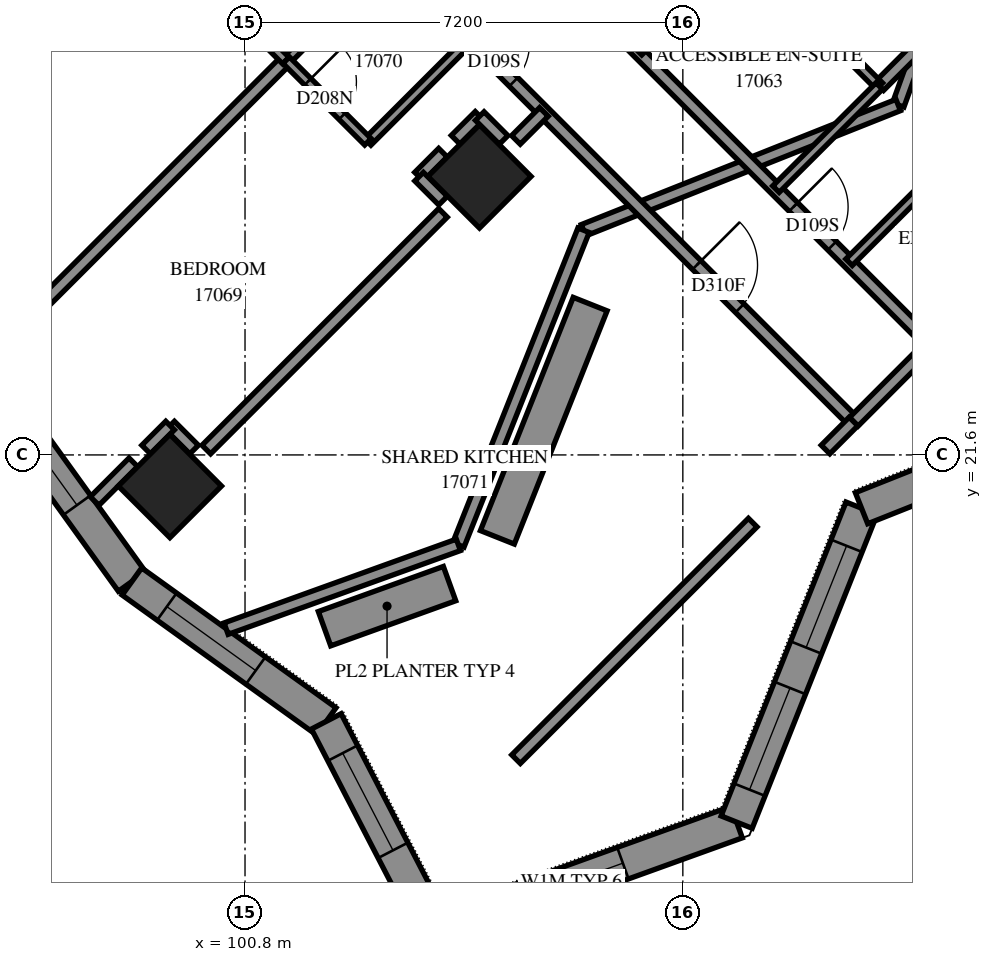
"""IFC4 building model, lengths in metres.
Left out: names, types, materials, properties, quantities, classifications, styles, units other than length and angle.
Written with IfcOpenShell. Run it as: python <this file> out.ifc"""

import sys

from ifc_helpers import new_model, si_unit, direction, frame, frame_2d, origin, origin_2d, place, context, subcontext, project, spatial, polyline, rectangle, outline, extrude, element, fill, save


model = new_model("IFC4")
c1 = context("Model", 3, precision=1e-05, world=origin(), true_north=direction((0.0, 1.0)))
c2 = subcontext(c1, "Body", "Model", "MODEL_VIEW")
j1 = project(units=[si_unit("LENGTHUNIT", "METRE"), si_unit("PLANEANGLEUNIT", "RADIAN")], contexts=[c1])
p1 = place(None, origin())
s1 = spatial("IfcSite", under=j1, at=p1, CompositionType="ELEMENT")
p2 = place(p1, origin())
s2 = spatial("IfcBuilding", under=s1, at=p2, CompositionType="ELEMENT")
p3 = place(p2, frame((0.0, 0.0, 64.4)))
s3 = spatial("IfcBuildingStorey", under=s2, at=p3, CompositionType="ELEMENT", Elevation=64.4)
for number, where, z_axis, x_axis in (
    (1, (104.656, 26.18, 0.0), (0.0, 0.0, 1.0), (0.707, -0.707, 0.0)),
    (2, (99.565, 21.088, 0.0), (0.0, 0.0, 1.0), (0.707, -0.707, 0.0)),
):
    element("IfcColumn", number, at=place(p3, frame(where, z_axis=z_axis, x_axis=x_axis)), inside=s3, PredefinedType="COLUMN", context=c2, shape_type="SweptSolid", body=[
        extrude(rectangle(XDim=1.2, YDim=1.2, at=origin_2d()), origin(), (0.0, 0.0, 1.0), 3.1),
    ])
p4 = place(p3, frame((103.919, 13.771, 0.0), z_axis=(0.0, 0.0, 1.0), x_axis=(0.9406967124, 0.3392487217, 0.0)))
e3 = element("IfcWall", 3, at=p4, inside=s3, PredefinedType="SOLIDWALL", context=c2, shape_type="SweptSolid", body=[
    extrude(outline(polyline([(-0.241, -0.275), (5.402, -0.275), (5.155, 0.275), (0.241, 0.275), (-0.241, -0.275)])), origin(), (0.0, 0.0, 1.0), 3.1),
])
p5 = place(p4, frame((1.489, 0.0, 0.7)))
e4 = element("IfcOpeningElement", 4, at=p5, cuts=e3, PredefinedType="OPENING", context=c2, shape_type="SweptSolid", body=[
    extrude(rectangle(XDim=1.8, YDim=1.8, at=frame_2d((0.9, 0.9))), frame((0.0, 0.285, 0.0), z_axis=(0.0, -1.0, 0.0), x_axis=(1.0, 0.0, 0.0)), (0.0, 0.0, 1.0), 0.57),
])
p6 = place(p3, frame((108.885, 15.562, 0.0), z_axis=(0.0, 0.0, 1.0), x_axis=(0.3697018694, 0.9291504333, 0.0)))
e5 = element("IfcWall", 5, at=p6, inside=s3, PredefinedType="SOLIDWALL", context=c2, shape_type="SweptSolid", body=[
    extrude(outline(polyline([(-0.124, -0.275), (5.437, -0.275), (5.674, 0.275), (0.124, 0.275), (-0.124, -0.275)])), origin(), (0.0, 0.0, 1.0), 3.1),
])
p7 = place(p6, frame((0.574, 0.0, 0.7)))
e6 = element("IfcOpeningElement", 6, at=p7, cuts=e5, PredefinedType="OPENING", context=c2, shape_type="SweptSolid", body=[
    extrude(rectangle(XDim=1.8, YDim=1.8, at=frame_2d((0.9, 0.9))), frame((0.0, 0.285, 0.0), z_axis=(0.0, -1.0, 0.0), x_axis=(1.0, 0.0, 0.0)), (0.0, 0.0, 1.0), 0.57),
])
p8 = place(p6, frame((3.09, 0.0, 0.7)))
e7 = element("IfcOpeningElement", 7, at=p8, cuts=e5, PredefinedType="OPENING", context=c2, shape_type="SweptSolid", body=[
    extrude(rectangle(XDim=1.8, YDim=1.8, at=frame_2d((0.9, 0.9))), frame((0.0, 0.285, 0.0), z_axis=(0.0, -1.0, 0.0), x_axis=(1.0, 0.0, 0.0)), (0.0, 0.0, 1.0), 0.57),
])
p9 = place(p3, frame((110.939, 20.724, 0.0), z_axis=(0.0, 0.0, 1.0), x_axis=(0.9291504333, 0.3697018694, 0.0)))
e8 = element("IfcWall", 8, at=p9, inside=s3, PredefinedType="SOLIDWALL", context=c2, shape_type="SweptSolid", body=[
    extrude(outline(polyline([(0.118, -0.275), (5.68, -0.275), (5.432, 0.275), (-0.118, 0.275), (0.118, -0.275)])), origin(), (0.0, 0.0, 1.0), 3.1),
])
p10 = place(p9, frame((1.749, 0.0, 0.7)))
e9 = element("IfcOpeningElement", 9, at=p10, cuts=e8, PredefinedType="OPENING", context=c2, shape_type="SweptSolid", body=[
    extrude(rectangle(XDim=1.8, YDim=2.0, at=frame_2d((0.9, 1.0))), frame((0.0, 0.285, 0.0), z_axis=(0.0, -1.0, 0.0), x_axis=(1.0, 0.0, 0.0)), (0.0, 0.0, 1.0), 0.57),
])
p11 = place(p3, frame((96.652, 22.698, 0.0), z_axis=(0.0, 0.0, 1.0), x_axis=(0.5841782792, -0.8116253681, 0.0)))
e10 = element("IfcWall", 10, at=p11, inside=s3, PredefinedType="SOLIDWALL", context=c2, shape_type="SweptSolid", body=[
    extrude(outline(polyline([(0.045, -0.275), (3.962, -0.275), (3.872, 0.275), (-0.045, 0.275), (0.045, -0.275)])), origin(), (0.0, 0.0, 1.0), 3.1),
])
p12 = place(p11, frame((0.57, 0.0, 0.7)))
e11 = element("IfcOpeningElement", 11, at=p12, cuts=e10, PredefinedType="OPENING", context=c2, shape_type="SweptSolid", body=[
    extrude(rectangle(XDim=1.8, YDim=2.0, at=frame_2d((0.9, 1.0))), frame((0.0, 0.285, 0.0), z_axis=(0.0, -1.0, 0.0), x_axis=(1.0, 0.0, 0.0)), (0.0, 0.0, 1.0), 0.57),
])
p13 = place(p3, frame((98.94, 19.519, 0.0), z_axis=(0.0, 0.0, 1.0), x_axis=(0.8116263259, -0.5841769485, 0.0)))
e12 = element("IfcWall", 12, at=p13, inside=s3, PredefinedType="SOLIDWALL", context=c2, shape_type="SweptSolid", body=[
    extrude(outline(polyline([(-0.045, -0.275), (3.872, -0.275), (4.004, 0.275), (0.045, 0.275), (-0.045, -0.275)])), origin(), (0.0, 0.0, 1.0), 3.1),
])
p14 = place(p13, frame((0.708, 0.0, 0.7)))
e13 = element("IfcOpeningElement", 13, at=p14, cuts=e12, PredefinedType="OPENING", context=c2, shape_type="SweptSolid", body=[
    extrude(rectangle(XDim=1.8, YDim=2.0, at=frame_2d((0.9, 1.0))), frame((0.0, 0.285, 0.0), z_axis=(0.0, -1.0, 0.0), x_axis=(1.0, 0.0, 0.0)), (0.0, 0.0, 1.0), 0.57),
])
p15 = place(p3, frame((102.136, 17.218, 0.0), z_axis=(0.0, 0.0, 1.0), x_axis=(0.4594243206, -0.8882169181, 0.0)))
e14 = element("IfcWall", 14, at=p15, inside=s3, PredefinedType="SOLIDWALL", context=c2, shape_type="SweptSolid", body=[
    extrude(outline(polyline([(0.066, -0.275), (4.123, -0.275), (3.64, 0.275), (-0.066, 0.275), (0.066, -0.275)])), origin(), (0.0, 0.0, 1.0), 3.1),
])
p16 = place(p15, frame((0.588, 0.0, 0.7)))
e15 = element("IfcOpeningElement", 15, at=p16, cuts=e14, PredefinedType="OPENING", context=c2, shape_type="SweptSolid", body=[
    extrude(rectangle(XDim=1.8, YDim=1.8, at=frame_2d((0.9, 0.9))), frame((0.0, 0.285, 0.0), z_axis=(0.0, -1.0, 0.0), x_axis=(1.0, 0.0, 0.0)), (0.0, 0.0, 1.0), 0.57),
])
p17 = place(p3, frame((113.239, 32.061, 0.0), z_axis=(0.0, 0.0, 1.0), x_axis=(-0.3392575143, -0.9406935415, 0.0)))
e16 = element("IfcWall", 16, at=p17, inside=s3, PredefinedType="PARAPET", context=c2, shape_type="SweptSolid", body=[
    extrude(outline(polyline([(0.0, -0.1), (4.185, -0.1), (4.185, 0.1), (0.0, 0.1), (0.0, -0.1)])), origin(), (0.0, 0.0, 1.0), 0.25),
])
p18 = place(p3, frame((111.819, 28.124, 0.0), z_axis=(0.0, 0.0, 1.0), x_axis=(-0.3392690321, -0.9406893876, 0.0)))
e17 = element("IfcWall", 17, at=p18, inside=s3, PredefinedType="PARAPET", context=c2, shape_type="SweptSolid", body=[
    extrude(outline(polyline([(0.0, -0.1), (0.773, -0.1), (0.863, 0.1), (0.0, 0.1), (0.0, -0.1)])), origin(), (0.0, 0.0, 1.0), 0.25),
])
p19 = place(p3, frame((111.542, 27.354, 0.0), z_axis=(0.0, 0.0, 1.0), x_axis=(-0.9291537819, -0.3696934536, 0.0)))
e18 = element("IfcWall", 18, at=p19, inside=s3, PredefinedType="PARAPET", context=c2, shape_type="SweptSolid", body=[
    extrude(outline(polyline([(0.045, -0.1), (5.612, -0.1), (5.526, 0.1), (-0.045, 0.1), (0.045, -0.1)])), origin(), (0.0, 0.0, 1.0), 0.25),
])
p20 = place(p3, frame((106.367, 25.295, 0.0), z_axis=(0.0, 0.0, 1.0), x_axis=(-0.3696779509, -0.92915995, 0.0)))
e19 = element("IfcWall", 19, at=p20, inside=s3, PredefinedType="PARAPET", context=c2, shape_type="SweptSolid", body=[
    extrude(outline(polyline([(-0.043, -0.1), (5.524, -0.1), (5.614, 0.1), (0.043, 0.1), (-0.043, -0.1)])), origin(), (0.0, 0.0, 1.0), 0.25),
])
p21 = place(p3, frame((104.309, 20.121, 0.0), z_axis=(0.0, 0.0, 1.0), x_axis=(-0.9407017457, -0.3392347648, 0.0)))
e20 = element("IfcWall", 20, at=p21, inside=s3, PredefinedType="PARAPET", context=c2, shape_type="SweptSolid", body=[
    extrude(outline(polyline([(0.045, -0.1), (4.061, -0.1), (4.061, 0.1), (-0.045, 0.1), (0.045, -0.1)])), origin(), (0.0, 0.0, 1.0), 0.25),
])
p22 = place(p3, frame((106.476, 24.081, 0.0), z_axis=(0.0, 0.0, 1.0), x_axis=(-0.369669248, -0.9291634125, 0.0)))
e21 = element("IfcWall", 21, at=p22, inside=s3, PredefinedType="SOLIDWALL", context=c2, shape_type="SweptSolid", body=[
    extrude(rectangle(XDim=4.128, YDim=0.6, at=frame_2d((2.064, 0.0))), origin(), (0.0, 0.0, 1.0), 0.65),
])
p23 = place(p3, frame((101.825, 31.125, 0.0), z_axis=(0.0, 0.0, 1.0), x_axis=(0.7071067812, -0.7071067812, 0.0)))
e22 = element("IfcWall", 22, at=p23, inside=s3, PredefinedType="PARTITIONING", context=c2, shape_type="SweptSolid", body=[
    extrude(rectangle(XDim=12.7, YDim=0.2, at=frame_2d((6.35, 0.0))), origin(), (0.0, 0.0, 1.0), 3.1),
])
p24 = place(p23, frame((3.895, 0.0, 0.0)))
e23 = element("IfcOpeningElement", 23, at=p24, cuts=e22, PredefinedType="OPENING", context=c2, shape_type="SweptSolid", body=[
    extrude(rectangle(XDim=0.9, YDim=2.1, at=frame_2d((0.45, 1.05))), frame((0.0, 0.11, 0.0), z_axis=(0.0, -1.0, 0.0), x_axis=(1.0, 0.0, 0.0)), (0.0, 0.0, 1.0), 0.22),
])
p25 = place(p23, frame((9.056, 0.0, 0.0)))
e24 = element("IfcOpeningElement", 24, at=p25, cuts=e22, PredefinedType="OPENING", context=c2, shape_type="SweptSolid", body=[
    extrude(rectangle(XDim=1.0, YDim=2.1, at=frame_2d((0.5, 1.05))), frame((0.0, 0.11, 0.0), z_axis=(0.0, -1.0, 0.0), x_axis=(1.0, 0.0, 0.0)), (0.0, 0.0, 1.0), 0.22),
])
p26 = place(p3, frame((106.987, 28.509, 0.0), z_axis=(0.0, 0.0, 1.0), x_axis=(0.7071067812, -0.7071067812, 0.0)))
e25 = element("IfcWall", 25, at=p26, inside=s3, PredefinedType="PARTITIONING", context=c2, shape_type="SweptSolid", body=[
    extrude(rectangle(XDim=7.198, YDim=0.2, at=frame_2d((3.599, 0.0))), origin(), (0.0, 0.0, 1.0), 3.1),
])
p27 = place(p26, frame((4.004, 0.0, 0.0)))
e26 = element("IfcOpeningElement", 26, at=p27, cuts=e25, PredefinedType="OPENING", context=c2, shape_type="SweptSolid", body=[
    extrude(rectangle(XDim=0.9, YDim=2.1, at=frame_2d((0.45, 1.05))), frame((0.0, 0.11, 0.0), z_axis=(0.0, -1.0, 0.0), x_axis=(1.0, 0.0, 0.0)), (0.0, 0.0, 1.0), 0.22),
])
p28 = place(p3, frame((96.517, 23.134, 0.0), z_axis=(0.0, 0.0, 1.0), x_axis=(0.7071139158, 0.7070996465, 0.0)))
e27 = element("IfcWall", 27, at=p28, inside=s3, PredefinedType="PARTITIONING", context=c2, shape_type="SweptSolid", body=[
    extrude(rectangle(XDim=7.008, YDim=0.2, at=frame_2d((3.504, 0.0))), origin(), (0.0, 0.0, 1.0), 3.1),
])
p29 = place(p3, frame((100.163, 21.689, 0.0), z_axis=(0.0, 0.0, 1.0), x_axis=(0.7071067812, 0.7071067812, 0.0)))
e28 = element("IfcWall", 28, at=p29, inside=s3, PredefinedType="PARTITIONING", context=c2, shape_type="SweptSolid", body=[
    extrude(rectangle(XDim=5.504, YDim=0.2, at=frame_2d((2.752, 0.0))), origin(), (0.0, 0.0, 1.0), 2.6),
])
p30 = place(p3, frame((105.257, 16.597, 0.0), z_axis=(0.0, 0.0, 1.0), x_axis=(0.7072884866, 0.706925029, 0.0)))
e29 = element("IfcWall", 29, at=p30, inside=s3, PredefinedType="PARTITIONING", context=c2, shape_type="SweptSolid", body=[
    extrude(rectangle(XDim=5.503, YDim=0.2, at=frame_2d((2.751, 0.0))), origin(), (0.0, 0.0, 1.0), 3.1),
])
p31 = place(p3, frame((111.231, 27.665, 0.0), z_axis=(0.0, 0.0, 1.0), x_axis=(0.7071067812, 0.7071067812, 0.0)))
e30 = element("IfcWall", 30, at=p31, inside=s3, PredefinedType="PARTITIONING", context=c2, shape_type="SweptSolid", body=[
    extrude(rectangle(XDim=4.55, YDim=0.2, at=frame_2d((2.275, 0.0))), origin(), (0.0, 0.0, 1.0), 3.1),
])
p32 = place(p3, frame((108.97, 29.928, 0.0), z_axis=(0.0, 0.0, 1.0), x_axis=(0.7067942478, -0.7074191764, 0.0)))
e31 = element("IfcWall", 31, at=p32, inside=s3, PredefinedType="PARTITIONING", context=c2, shape_type="SweptSolid", body=[
    extrude(rectangle(XDim=3.2, YDim=0.15, at=frame_2d((1.6, 0.0))), origin(), (0.0, 0.0, 1.0), 3.1),
])
p33 = place(p32, frame((1.148, 0.0, 0.0)))
e32 = element("IfcOpeningElement", 32, at=p33, cuts=e31, PredefinedType="OPENING", context=c2, shape_type="SweptSolid", body=[
    extrude(rectangle(XDim=0.8, YDim=2.1, at=frame_2d((0.4, 1.05))), frame((0.0, 0.085, 0.0), z_axis=(0.0, -1.0, 0.0), x_axis=(1.0, 0.0, 0.0)), (0.0, 0.0, 1.0), 0.17),
])
p34 = place(p3, frame((107.271, 28.231, 0.0), z_axis=(0.0, 0.0, 1.0), x_axis=(0.7071067812, 0.7071067812, 0.0)))
e33 = element("IfcWall", 33, at=p34, inside=s3, PredefinedType="PARTITIONING", context=c2, shape_type="SweptSolid", body=[
    extrude(rectangle(XDim=2.401, YDim=0.15, at=frame_2d((1.201, 0.0))), origin(), (0.0, 0.0, 1.0), 3.1),
])
for number, where, z_axis, x_axis in (
    (34, (101.477, 28.085, 0.0), (0.0, 0.0, 1.0), (0.707, 0.708, 0.0)),
    (35, (109.531, 25.971, 0.0), (0.0, 0.0, 1.0), (0.708, 0.707, 0.0)),
    (36, (110.734, 24.768, 0.0), (0.0, 0.0, 1.0), (0.708, 0.707, 0.0)),
):
    element("IfcWall", number, at=place(p3, frame(where, z_axis=z_axis, x_axis=x_axis)), inside=s3, PredefinedType="PARTITIONING", context=c2, shape_type="SweptSolid", body=[
        extrude(rectangle(XDim=2.4, YDim=0.15, at=frame_2d((1.2, 0.0))), origin(), (0.0, 0.0, 1.0), 3.1),
    ])
p35 = place(p3, frame((102.817, 26.747, 0.0), z_axis=(0.0, 0.0, 1.0), x_axis=(0.7071067812, 0.7071067812, 0.0)))
e37 = element("IfcWall", 37, at=p35, inside=s3, PredefinedType="PARTITIONING", context=c2, shape_type="SweptSolid", body=[
    extrude(rectangle(XDim=2.398, YDim=0.15, at=frame_2d((1.199, 0.0))), origin(), (0.0, 0.0, 1.0), 3.1),
])
p36 = place(p3, frame((100.127, 29.429, 0.0), z_axis=(0.0, 0.0, 1.0), x_axis=(0.7071067812, -0.7071067812, 0.0)))
e38 = element("IfcWall", 38, at=p36, inside=s3, PredefinedType="PARTITIONING", context=c2, shape_type="SweptSolid", body=[
    extrude(rectangle(XDim=1.901, YDim=0.15, at=frame_2d((0.95, 0.0))), origin(), (0.0, 0.0, 1.0), 3.1),
])
p37 = place(p36, frame((0.508, 0.0, 0.0)))
e39 = element("IfcOpeningElement", 39, at=p37, cuts=e38, PredefinedType="OPENING", context=c2, shape_type="SweptSolid", body=[
    extrude(rectangle(XDim=0.8, YDim=2.1, at=frame_2d((0.4, 1.05))), frame((0.0, 0.085, 0.0), z_axis=(0.0, -1.0, 0.0), x_axis=(1.0, 0.0, 0.0)), (0.0, 0.0, 1.0), 0.17),
])
p38 = place(p3, frame((101.477, 28.091, 0.0), z_axis=(0.0, 0.0, 1.0), x_axis=(0.7076330979, -0.7065800724, 0.0)))
e40 = element("IfcWall", 40, at=p38, inside=s3, PredefinedType="PARTITIONING", context=c2, shape_type="SweptSolid", body=[
    extrude(rectangle(XDim=1.899, YDim=0.15, at=frame_2d((0.95, 0.0))), origin(), (0.0, 0.0, 1.0), 3.1),
])
p39 = place(p38, frame((0.501, 0.0, 0.0)))
e41 = element("IfcOpeningElement", 41, at=p39, cuts=e40, PredefinedType="OPENING", context=c2, shape_type="SweptSolid", body=[
    extrude(rectangle(XDim=0.8, YDim=2.1, at=frame_2d((0.4, 1.05))), frame((0.0, 0.085, 0.0), z_axis=(0.0, -1.0, 0.0), x_axis=(1.0, 0.0, 0.0)), (0.0, 0.0, 1.0), 0.17),
])
p40 = place(p3, frame((110.811, 22.145, 0.0), z_axis=(0.0, 0.0, 1.0), x_axis=(0.7065510983, 0.7076620277, 0.0)))
e42 = element("IfcWall", 42, at=p40, inside=s3, PredefinedType="PARTITIONING", context=c2, shape_type="SweptSolid", body=[
    extrude(rectangle(XDim=1.8, YDim=0.2, at=frame_2d((0.9, 0.0))), origin(), (0.0, 0.0, 1.0), 3.1),
])
p41 = place(p3, frame((98.327, 20.842, 0.0), z_axis=(0.0, 0.0, 1.0), x_axis=(0.7071067812, 0.7071067812, 0.0)))
e43 = element("IfcWall", 43, at=p41, inside=s3, PredefinedType="PARTITIONING", context=c2, shape_type="SweptSolid", body=[
    extrude(rectangle(XDim=0.9, YDim=0.2, at=frame_2d((0.45, 0.0))), origin(), (0.0, 0.0, 1.0), 3.1),
])
p42 = place(p3, frame((110.347, 21.689, 0.0), z_axis=(0.0, 0.0, 1.0), x_axis=(0.7071067812, 0.7071067812, 0.0)))
e44 = element("IfcWall", 44, at=p42, inside=s3, PredefinedType="PARTITIONING", context=c2, shape_type="SweptSolid", body=[
    extrude(rectangle(XDim=0.65, YDim=0.2, at=frame_2d((0.325, 0.0))), origin(), (0.0, 0.0, 1.0), 3.1),
])
p43 = place(p3, frame((105.255, 26.781, 0.0), z_axis=(0.0, 0.0, 1.0), x_axis=(0.7071067812, 0.7071067812, 0.0)))
e45 = element("IfcWall", 45, at=p43, inside=s3, PredefinedType="PARTITIONING", context=c2, shape_type="SweptSolid", body=[
    extrude(rectangle(XDim=0.65, YDim=0.2, at=frame_2d((0.325, 0.0))), origin(), (0.0, 0.0, 1.0), 2.6),
])
for number, where, z_axis, x_axis in (
    (46, (99.568, 22.082, 0.0), (0.0, 0.0, 1.0), (0.707, -0.707, 0.0)),
    (47, (99.173, 21.689, 0.0), (0.0, 0.0, 1.0), (0.707, 0.707, 0.0)),
    (48, (103.661, 26.177, 0.0), (0.0, 0.0, 1.0), (0.707, 0.707, 0.0)),
    (49, (103.662, 26.177, 0.0), (0.0, 0.0, 1.0), (0.707, -0.707, 0.0)),
):
    element("IfcWall", number, at=place(p3, frame(where, z_axis=z_axis, x_axis=x_axis)), inside=s3, PredefinedType="PARTITIONING", context=c2, shape_type="SweptSolid", body=[
        extrude(rectangle(XDim=0.557, YDim=0.2, at=frame_2d((0.279, 0.0))), origin(), (0.0, 0.0, 1.0), 3.1),
    ])
p44 = place(p3, frame((104.263, 26.784, 0.0), z_axis=(0.0, 0.0, 1.0), x_axis=(0.7089037401, 0.705305244, 0.0)))
e50 = element("IfcWall", 50, at=p44, inside=s3, PredefinedType="PARTITIONING", context=c2, shape_type="SweptSolid", body=[
    extrude(rectangle(XDim=0.556, YDim=0.2, at=frame_2d((0.278, 0.0))), origin(), (0.0, 0.0, 1.0), 3.1),
])
p45 = place(p3, frame((104.66, 27.172, 0.0), z_axis=(0.0, 0.0, 1.0), x_axis=(0.7071067812, -0.7071067812, 0.0)))
e51 = element("IfcWall", 51, at=p45, inside=s3, PredefinedType="PARTITIONING", context=c2, shape_type="SweptSolid", body=[
    extrude(rectangle(XDim=0.554, YDim=0.2, at=frame_2d((0.277, 0.0))), origin(), (0.0, 0.0, 1.0), 3.1),
])
p46 = place(p3, frame((104.164, 19.484, 0.0), z_axis=(0.0, 0.0, 1.0), x_axis=(-0.9406930598, -0.3392588499, 0.0)))
e52 = element("IfcWall", 52, at=p46, inside=s3, PredefinedType="SOLIDWALL", context=c2, shape_type="SweptSolid", body=[
    extrude(outline(polyline([(0.0, -0.3), (2.186, -0.3), (2.186, 0.3), (0.0, 0.3), (0.0, -0.3)])), origin(), (0.0, 0.0, 1.0), 0.65),
])
p47 = place(p5, origin())
e53 = element("IfcWindow", 53, at=p47, inside=s3, PartitioningType="SINGLE_PANEL", PredefinedType="WINDOW", context=c2, shape_type="SweptSolid", body=[
    extrude(rectangle(XDim=1.8, YDim=1.8, at=frame_2d((0.9, 0.9))), frame((0.0, 0.155, 0.0), z_axis=(0.0, -1.0, 0.0), x_axis=(1.0, 0.0, 0.0)), (0.0, 0.0, 1.0), 0.06),
])
fill(e4, e53)
p48 = place(p7, origin())
e54 = element("IfcWindow", 54, at=p48, inside=s3, PartitioningType="SINGLE_PANEL", PredefinedType="WINDOW", context=c2, shape_type="SweptSolid", body=[
    extrude(rectangle(XDim=1.8, YDim=1.8, at=frame_2d((0.9, 0.9))), frame((0.0, 0.155, 0.0), z_axis=(0.0, -1.0, 0.0), x_axis=(1.0, 0.0, 0.0)), (0.0, 0.0, 1.0), 0.06),
])
fill(e6, e54)
p49 = place(p8, origin())
e55 = element("IfcWindow", 55, at=p49, inside=s3, PartitioningType="SINGLE_PANEL", PredefinedType="WINDOW", context=c2, shape_type="SweptSolid", body=[
    extrude(rectangle(XDim=1.8, YDim=1.8, at=frame_2d((0.9, 0.9))), frame((0.0, 0.155, 0.0), z_axis=(0.0, -1.0, 0.0), x_axis=(1.0, 0.0, 0.0)), (0.0, 0.0, 1.0), 0.06),
])
fill(e7, e55)
p50 = place(p12, origin())
e56 = element("IfcWindow", 56, at=p50, inside=s3, PartitioningType="SINGLE_PANEL", PredefinedType="WINDOW", context=c2, shape_type="SweptSolid", body=[
    extrude(rectangle(XDim=1.8, YDim=2.0, at=frame_2d((0.9, 1.0))), frame((0.0, 0.155, 0.0), z_axis=(0.0, -1.0, 0.0), x_axis=(1.0, 0.0, 0.0)), (0.0, 0.0, 1.0), 0.06),
])
fill(e11, e56)
p51 = place(p14, origin())
e57 = element("IfcWindow", 57, at=p51, inside=s3, PartitioningType="SINGLE_PANEL", PredefinedType="WINDOW", context=c2, shape_type="SweptSolid", body=[
    extrude(rectangle(XDim=1.8, YDim=2.0, at=frame_2d((0.9, 1.0))), frame((0.0, 0.155, 0.0), z_axis=(0.0, -1.0, 0.0), x_axis=(1.0, 0.0, 0.0)), (0.0, 0.0, 1.0), 0.06),
])
fill(e13, e57)
p52 = place(p16, origin())
e58 = element("IfcWindow", 58, at=p52, inside=s3, PartitioningType="SINGLE_PANEL", PredefinedType="WINDOW", context=c2, shape_type="SweptSolid", body=[
    extrude(rectangle(XDim=1.8, YDim=1.8, at=frame_2d((0.9, 0.9))), frame((0.0, 0.155, 0.0), z_axis=(0.0, -1.0, 0.0), x_axis=(1.0, 0.0, 0.0)), (0.0, 0.0, 1.0), 0.06),
])
fill(e15, e58)
p53 = place(p24, origin())
e59 = element("IfcDoor", 59, at=p53, inside=s3, OperationType="SINGLE_SWING_LEFT", PredefinedType="DOOR", context=c2, shape_type="SweptSolid", body=[
    extrude(rectangle(XDim=0.9, YDim=2.1, at=frame_2d((0.45, 1.05))), frame((0.0, 0.025, 0.0), z_axis=(0.0, -1.0, 0.0), x_axis=(1.0, 0.0, 0.0)), (0.0, 0.0, 1.0), 0.05),
])
fill(e23, e59)
p54 = place(p39, origin())
e60 = element("IfcDoor", 60, at=p54, inside=s3, OperationType="SINGLE_SWING_RIGHT", PredefinedType="DOOR", context=c2, shape_type="SweptSolid", body=[
    extrude(rectangle(XDim=0.8, YDim=2.1, at=frame_2d((0.4, 1.05))), frame((0.0, 0.025, 0.0), z_axis=(0.0, -1.0, 0.0), x_axis=(1.0, 0.0, 0.0)), (0.0, 0.0, 1.0), 0.05),
])
fill(e41, e60)
p55 = place(p25, origin())
e61 = element("IfcDoor", 61, at=p55, inside=s3, OperationType="SINGLE_SWING_RIGHT", PredefinedType="DOOR", context=c2, shape_type="SweptSolid", body=[
    extrude(rectangle(XDim=1.0, YDim=2.1, at=frame_2d((0.5, 1.05))), frame((0.0, 0.025, 0.0), z_axis=(0.0, -1.0, 0.0), x_axis=(1.0, 0.0, 0.0)), (0.0, 0.0, 1.0), 0.05),
])
fill(e24, e61)
p56 = place(p27, origin())
e62 = element("IfcDoor", 62, at=p56, inside=s3, OperationType="SINGLE_SWING_RIGHT", PredefinedType="DOOR", context=c2, shape_type="SweptSolid", body=[
    extrude(rectangle(XDim=0.9, YDim=2.1, at=frame_2d((0.45, 1.05))), frame((0.0, 0.025, 0.0), z_axis=(0.0, -1.0, 0.0), x_axis=(1.0, 0.0, 0.0)), (0.0, 0.0, 1.0), 0.05),
])
fill(e26, e62)
save(model, sys.argv[1])
